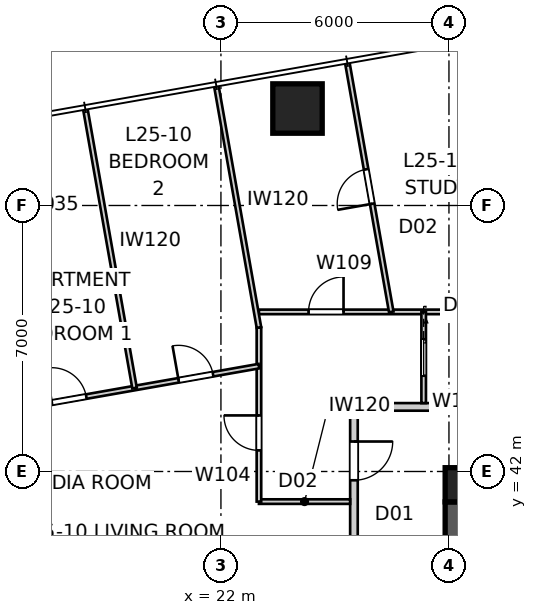
"""IFC4 building model, lengths in metres.
Left out: names, types, materials, properties, quantities, classifications, styles, units other than length and angle.
Written with IfcOpenShell. Run it as: python <this file> out.ifc"""

import sys

from ifc_helpers import new_model, si_unit, direction, frame, frame_2d, origin, origin_2d, place, context, subcontext, project, spatial, polyline, rectangle, outline, extrude, element, fill, save


model = new_model("IFC4")
c1 = context("Model", 3, precision=1e-05, world=origin(), true_north=direction((0.0, 1.0)))
c2 = subcontext(c1, "Body", "Model", "MODEL_VIEW")
j1 = project(units=[si_unit("LENGTHUNIT", "METRE"), si_unit("PLANEANGLEUNIT", "RADIAN")], contexts=[c1])
p1 = place(None, origin())
s1 = spatial("IfcSite", under=j1, at=p1, CompositionType="ELEMENT")
p2 = place(p1, origin())
s2 = spatial("IfcBuilding", under=s1, at=p2, CompositionType="ELEMENT")
p3 = place(p2, frame((0.0, 0.0, 93.0)))
s3 = spatial("IfcBuildingStorey", under=s2, at=p3, CompositionType="ELEMENT", Elevation=93.0)
p4 = place(p3, frame((28.35, 41.2, 0.0), z_axis=(0.0, 0.0, 1.0), x_axis=(0.0, -1.0, 0.0)))
e1 = element("IfcWall", 1, at=p4, inside=s3, PredefinedType="SHEAR", context=c2, shape_type="SweptSolid", body=[
    extrude(outline(polyline([(0.0, -0.45), (22.4, -0.45), (22.4, -0.025), (22.85, -0.025), (22.85, 0.025), (22.4, 0.025), (22.4, 0.45), (0.0, 0.45), (0.0, 0.025), (-0.45, 0.025), (-0.45, -0.025), (0.0, -0.025), (0.0, -0.45)])), origin(), (0.0, 0.0, 1.0), 3.4),
])
p5 = place(p4, frame((11.14, 0.0, 0.0)))
e2 = element("IfcOpeningElement", 2, at=p5, cuts=e1, PredefinedType="OPENING", context=c2, shape_type="SweptSolid", body=[
    extrude(rectangle(XDim=1.02, YDim=2.4, at=frame_2d((0.51, 1.2))), frame((0.0, 0.46, 0.0), z_axis=(0.0, -1.0, 0.0), x_axis=(1.0, 0.0, 0.0)), (0.0, 0.0, 1.0), 0.92),
])
p6 = place(p3, frame((28.35, 41.65, 0.0), z_axis=(0.0, 0.0, 1.0), x_axis=(1.0, 0.0, 0.0)))
e3 = element("IfcColumn", 3, at=p6, inside=s3, PredefinedType="COLUMN", context=c2, shape_type="SweptSolid", body=[
    extrude(rectangle(XDim=0.9, YDim=0.9, at=origin_2d()), origin(), (0.0, 0.0, 1.0), 3.4),
])
p7 = place(p3, frame((24.015, 51.552, 0.0), z_axis=(0.0, 0.0, 1.0), x_axis=(1.0, 0.0, 0.0)))
e4 = element("IfcColumn", 4, at=p7, inside=s3, PredefinedType="COLUMN", context=c2, shape_type="SweptSolid", body=[
    extrude(rectangle(XDim=1.3, YDim=1.3, at=origin_2d()), origin(), (0.0, 0.0, 1.0), 3.4),
])
p8 = place(p3, frame((54.5, 43.7, 0.0), z_axis=(0.0, 0.0, 1.0), x_axis=(-1.0, 0.0, 0.0)))
e5 = element("IfcWall", 5, at=p8, inside=s3, PredefinedType="PARTITIONING", context=c2, shape_type="SweptSolid", body=[
    extrude(rectangle(XDim=29.0, YDim=0.2, at=frame_2d((14.5, 0.0))), origin(), (0.0, 0.0, 1.0), 3.25),
])
p9 = place(p8, frame((11.951, 0.0, 0.0)))
e6 = element("IfcOpeningElement", 6, at=p9, cuts=e5, PredefinedType="OPENING", context=c2, shape_type="SweptSolid", body=[
    extrude(rectangle(XDim=1.02, YDim=2.34, at=frame_2d((0.51, 1.17))), frame((0.0, 0.11, 0.0), z_axis=(0.0, -1.0, 0.0), x_axis=(1.0, 0.0, 0.0)), (0.0, 0.0, 1.0), 0.22),
])
p10 = place(p8, frame((4.795, 0.0, 0.0)))
e7 = element("IfcOpeningElement", 7, at=p10, cuts=e5, PredefinedType="OPENING", context=c2, shape_type="SweptSolid", body=[
    extrude(rectangle(XDim=1.02, YDim=2.34, at=frame_2d((0.51, 1.17))), frame((0.0, 0.11, 0.0), z_axis=(0.0, -1.0, 0.0), x_axis=(1.0, 0.0, 0.0)), (0.0, 0.0, 1.0), 0.22),
])
p11 = place(p3, frame((25.5, 43.7, 0.0), z_axis=(0.0, 0.0, 1.0), x_axis=(0.0, -1.0, 0.0)))
e8 = element("IfcWall", 8, at=p11, inside=s3, PredefinedType="PARTITIONING", context=c2, shape_type="SweptSolid", body=[
    extrude(rectangle(XDim=27.4, YDim=0.2, at=frame_2d((13.7, 0.0))), origin(), (0.0, 0.0, 1.0), 3.25),
])
p12 = place(p11, frame((24.333, 0.0, 0.0)))
e9 = element("IfcOpeningElement", 9, at=p12, cuts=e8, PredefinedType="OPENING", context=c2, shape_type="SweptSolid", body=[
    extrude(rectangle(XDim=1.02, YDim=2.1, at=frame_2d((0.51, 1.05))), frame((0.0, 0.11, 0.0), z_axis=(0.0, -1.0, 0.0), x_axis=(1.0, 0.0, 0.0)), (0.0, 0.0, 1.0), 0.22),
])
p13 = place(p11, frame((10.631, 0.0, 0.0)))
e10 = element("IfcOpeningElement", 10, at=p13, cuts=e8, PredefinedType="OPENING", context=c2, shape_type="SweptSolid", body=[
    extrude(rectangle(XDim=1.02, YDim=2.34, at=frame_2d((0.51, 1.17))), frame((0.0, 0.11, 0.0), z_axis=(0.0, -1.0, 0.0), x_axis=(1.0, 0.0, 0.0)), (0.0, 0.0, 1.0), 0.22),
])
p14 = place(p11, frame((0.911, 0.0, 0.0)))
e11 = element("IfcOpeningElement", 11, at=p14, cuts=e8, PredefinedType="OPENING", context=c2, shape_type="SweptSolid", body=[
    extrude(rectangle(XDim=1.02, YDim=2.34, at=frame_2d((0.51, 1.17))), frame((0.0, 0.11, 0.0), z_axis=(0.0, -1.0, 0.0), x_axis=(1.0, 0.0, 0.0)), (0.0, 0.0, 1.0), 0.22),
])
p15 = place(p3, frame((23.0, 46.2, 0.0), z_axis=(0.0, 0.0, 1.0), x_axis=(1.0, 0.0, 0.0)))
e12 = element("IfcWall", 12, at=p15, inside=s3, PredefinedType="PARTITIONING", context=c2, shape_type="SweptSolid", body=[
    extrude(rectangle(XDim=34.0, YDim=0.12, at=frame_2d((17.0, 0.0))), origin(), (0.0, 0.0, 1.0), 2.55),
])
p16 = place(p15, frame((18.989, 0.0, 0.0)))
e13 = element("IfcOpeningElement", 13, at=p16, cuts=e12, PredefinedType="OPENING", context=c2, shape_type="SweptSolid", body=[
    extrude(rectangle(XDim=0.92, YDim=2.34, at=frame_2d((0.46, 1.17))), frame((0.0, 0.07, 0.0), z_axis=(0.0, -1.0, 0.0), x_axis=(1.0, 0.0, 0.0)), (0.0, 0.0, 1.0), 0.14),
])
p17 = place(p15, frame((1.306, 0.0, 0.0)))
e14 = element("IfcOpeningElement", 14, at=p17, cuts=e12, PredefinedType="OPENING", context=c2, shape_type="SweptSolid", body=[
    extrude(rectangle(XDim=0.92, YDim=2.34, at=frame_2d((0.46, 1.17))), frame((0.0, 0.07, 0.0), z_axis=(0.0, -1.0, 0.0), x_axis=(1.0, 0.0, 0.0)), (0.0, 0.0, 1.0), 0.14),
])
p18 = place(p15, frame((13.884, 0.0, 0.0)))
e15 = element("IfcOpeningElement", 15, at=p18, cuts=e12, PredefinedType="OPENING", context=c2, shape_type="SweptSolid", body=[
    extrude(rectangle(XDim=0.96, YDim=2.1, at=frame_2d((0.48, 1.05))), frame((0.0, 0.07, 0.0), z_axis=(0.0, -1.0, 0.0), x_axis=(1.0, 0.0, 0.0)), (0.0, 0.0, 1.0), 0.14),
])
p19 = place(p15, frame((21.929, 0.0, 0.0)))
e16 = element("IfcOpeningElement", 16, at=p19, cuts=e12, PredefinedType="OPENING", context=c2, shape_type="SweptSolid", body=[
    extrude(rectangle(XDim=0.96, YDim=2.1, at=frame_2d((0.48, 1.05))), frame((0.0, 0.07, 0.0), z_axis=(0.0, -1.0, 0.0), x_axis=(1.0, 0.0, 0.0)), (0.0, 0.0, 1.0), 0.14),
])
p20 = place(p3, frame((27.335, 46.2, 0.0), z_axis=(0.0, 0.0, 1.0), x_axis=(0.0, -1.0, 0.0)))
e17 = element("IfcWall", 17, at=p20, inside=s3, PredefinedType="PARTITIONING", context=c2, shape_type="SweptSolid", body=[
    extrude(rectangle(XDim=2.4, YDim=0.12, at=frame_2d((1.2, 0.0))), origin(), (0.0, 0.0, 1.0), 2.722),
])
p21 = place(p20, frame((0.72, 0.0, 0.0)))
e18 = element("IfcOpeningElement", 18, at=p21, cuts=e17, PredefinedType="OPENING", context=c2, shape_type="SweptSolid", body=[
    extrude(rectangle(XDim=0.96, YDim=2.1, at=frame_2d((0.48, 1.05))), frame((0.0, 0.07, 0.0), z_axis=(0.0, -1.0, 0.0), x_axis=(1.0, 0.0, 0.0)), (0.0, 0.0, 1.0), 0.14),
])
p22 = place(p3, frame((25.4, 41.208, 0.0), z_axis=(0.0, 0.0, 1.0), x_axis=(-1.0, 0.0, 0.0)))
e19 = element("IfcWall", 19, at=p22, inside=s3, PredefinedType="PARTITIONING", context=c2, shape_type="SweptSolid", body=[
    extrude(rectangle(XDim=2.4, YDim=0.12, at=frame_2d((1.2, 0.0))), origin(), (0.0, 0.0, 1.0), 2.638),
])
p23 = place(p3, frame((23.0, 41.208, 0.0), z_axis=(0.0, 0.0, 1.0), x_axis=(0.0, 1.0, 0.0)))
e20 = element("IfcWall", 20, at=p23, inside=s3, PredefinedType="PARTITIONING", context=c2, shape_type="SweptSolid", body=[
    extrude(rectangle(XDim=4.581, YDim=0.12, at=frame_2d((2.291, 0.0))), origin(), (0.0, 0.0, 1.0), 2.638),
])
p24 = place(p23, frame((1.348, 0.0, 0.0)))
e21 = element("IfcOpeningElement", 21, at=p24, cuts=e20, PredefinedType="OPENING", context=c2, shape_type="SweptSolid", body=[
    extrude(rectangle(XDim=0.92, YDim=2.34, at=frame_2d((0.46, 1.17))), frame((0.0, 0.07, 0.0), z_axis=(0.0, -1.0, 0.0), x_axis=(1.0, 0.0, 0.0)), (0.0, 0.0, 1.0), 0.14),
])
p25 = place(p3, frame((12.38, 42.9, 0.0), z_axis=(0.0, 0.0, 1.0), x_axis=(0.984807253583, 0.173651010046, 0.0)))
e22 = element("IfcWall", 22, at=p25, inside=s3, PredefinedType="PARTITIONING", context=c2, shape_type="SweptSolid", body=[
    extrude(rectangle(XDim=10.783, YDim=0.12, at=frame_2d((5.392, 0.0))), origin(), (0.0, 0.0, 1.0), 3.25),
])
p26 = place(p25, frame((1.525, 0.0, 0.0)))
e23 = element("IfcOpeningElement", 23, at=p26, cuts=e22, PredefinedType="OPENING", context=c2, shape_type="SweptSolid", body=[
    extrude(rectangle(XDim=0.92, YDim=2.34, at=frame_2d((0.46, 1.17))), frame((0.0, 0.07, 0.0), z_axis=(0.0, -1.0, 0.0), x_axis=(1.0, 0.0, 0.0)), (0.0, 0.0, 1.0), 0.14),
])
p27 = place(p25, frame((5.25, 0.0, 0.0)))
e24 = element("IfcOpeningElement", 24, at=p27, cuts=e22, PredefinedType="OPENING", context=c2, shape_type="SweptSolid", body=[
    extrude(rectangle(XDim=0.92, YDim=2.34, at=frame_2d((0.46, 1.17))), frame((0.0, 0.07, 0.0), z_axis=(0.0, -1.0, 0.0), x_axis=(1.0, 0.0, 0.0)), (0.0, 0.0, 1.0), 0.14),
])
p28 = place(p25, frame((8.637, 0.0, 0.0)))
e25 = element("IfcOpeningElement", 25, at=p28, cuts=e22, PredefinedType="OPENING", context=c2, shape_type="SweptSolid", body=[
    extrude(rectangle(XDim=0.92, YDim=2.34, at=frame_2d((0.46, 1.17))), frame((0.0, 0.07, 0.0), z_axis=(0.0, -1.0, 0.0), x_axis=(1.0, 0.0, 0.0)), (0.0, 0.0, 1.0), 0.14),
])
p29 = place(p3, frame((18.432, 51.542, 0.0), z_axis=(0.0, 0.0, 1.0), x_axis=(0.173647177755, -0.984807929323, 0.0)))
e26 = element("IfcWall", 26, at=p29, inside=s3, PredefinedType="PARTITIONING", context=c2, shape_type="SweptSolid", body=[
    extrude(rectangle(XDim=7.46, YDim=0.12, at=frame_2d((3.73, 0.0))), origin(), (0.0, 0.0, 1.0), 3.25),
])
p30 = place(p3, frame((21.878, 52.15, 0.0), z_axis=(0.0, 0.0, 1.0), x_axis=(0.173653792983, -0.984806762864, 0.0)))
e27 = element("IfcWall", 27, at=p30, inside=s3, PredefinedType="PARTITIONING", context=c2, shape_type="SweptSolid", body=[
    extrude(rectangle(XDim=6.459, YDim=0.12, at=frame_2d((3.229, 0.0))), origin(), (0.0, 0.0, 1.0), 2.638),
])
p31 = place(p3, frame((26.481, 46.2, 0.0), z_axis=(0.0, 0.0, 1.0), x_axis=(-0.173643103339, 0.98480864774, 0.0)))
e28 = element("IfcWall", 28, at=p31, inside=s3, PredefinedType="PARTITIONING", context=c2, shape_type="SweptSolid", body=[
    extrude(rectangle(XDim=6.659, YDim=0.12, at=frame_2d((3.329, 0.0))), origin(), (0.0, 0.0, 1.0), 3.25),
])
p32 = place(p31, frame((2.889, 0.0, 0.0)))
e29 = element("IfcOpeningElement", 29, at=p32, cuts=e28, PredefinedType="OPENING", context=c2, shape_type="SweptSolid", body=[
    extrude(rectangle(XDim=0.92, YDim=2.34, at=frame_2d((0.46, 1.17))), frame((0.0, 0.07, 0.0), z_axis=(0.0, -1.0, 0.0), x_axis=(1.0, 0.0, 0.0)), (0.0, 0.0, 1.0), 0.14),
])
p33 = place(p14, origin())
e30 = element("IfcDoor", 30, at=p33, inside=s3, OperationType="SINGLE_SWING_LEFT", PredefinedType="DOOR", context=c2, shape_type="SweptSolid", body=[
    extrude(rectangle(XDim=1.02, YDim=2.34, at=frame_2d((0.51, 1.17))), frame((0.0, 0.025, 0.0), z_axis=(0.0, -1.0, 0.0), x_axis=(1.0, 0.0, 0.0)), (0.0, 0.0, 1.0), 0.05),
])
fill(e11, e30)
p34 = place(p24, origin())
e31 = element("IfcDoor", 31, at=p34, inside=s3, OperationType="SINGLE_SWING_RIGHT", PredefinedType="DOOR", context=c2, shape_type="SweptSolid", body=[
    extrude(rectangle(XDim=0.92, YDim=2.34, at=frame_2d((0.46, 1.17))), frame((0.0, 0.025, 0.0), z_axis=(0.0, -1.0, 0.0), x_axis=(1.0, 0.0, 0.0)), (0.0, 0.0, 1.0), 0.05),
])
fill(e21, e31)
p35 = place(p17, origin())
e32 = element("IfcDoor", 32, at=p35, inside=s3, OperationType="SINGLE_SWING_RIGHT", PredefinedType="DOOR", context=c2, shape_type="SweptSolid", body=[
    extrude(rectangle(XDim=0.92, YDim=2.34, at=frame_2d((0.46, 1.17))), frame((0.0, 0.025, 0.0), z_axis=(0.0, -1.0, 0.0), x_axis=(1.0, 0.0, 0.0)), (0.0, 0.0, 1.0), 0.05),
])
fill(e14, e32)
p36 = place(p21, origin())
e33 = element("IfcDoor", 33, at=p36, inside=s3, OperationType="SLIDING_TO_LEFT", PredefinedType="DOOR", context=c2, shape_type="SweptSolid", body=[
    extrude(rectangle(XDim=0.96, YDim=2.1, at=frame_2d((0.48, 1.05))), frame((0.0, 0.025, 0.0), z_axis=(0.0, -1.0, 0.0), x_axis=(1.0, 0.0, 0.0)), (0.0, 0.0, 1.0), 0.05),
])
fill(e18, e33)
p37 = place(p27, origin())
e34 = element("IfcDoor", 34, at=p37, inside=s3, OperationType="SINGLE_SWING_LEFT", PredefinedType="DOOR", context=c2, shape_type="SweptSolid", body=[
    extrude(rectangle(XDim=0.92, YDim=2.34, at=frame_2d((0.46, 1.17))), frame((0.0, 0.025, 0.0), z_axis=(0.0, -1.0, 0.0), x_axis=(1.0, 0.0, 0.0)), (0.0, 0.0, 1.0), 0.05),
])
fill(e24, e34)
p38 = place(p28, origin())
e35 = element("IfcDoor", 35, at=p38, inside=s3, OperationType="SINGLE_SWING_LEFT", PredefinedType="DOOR", context=c2, shape_type="SweptSolid", body=[
    extrude(rectangle(XDim=0.92, YDim=2.34, at=frame_2d((0.46, 1.17))), frame((0.0, 0.025, 0.0), z_axis=(0.0, -1.0, 0.0), x_axis=(1.0, 0.0, 0.0)), (0.0, 0.0, 1.0), 0.05),
])
fill(e25, e35)
p39 = place(p32, origin())
e36 = element("IfcDoor", 36, at=p39, inside=s3, OperationType="SINGLE_SWING_LEFT", PredefinedType="DOOR", context=c2, shape_type="SweptSolid", body=[
    extrude(rectangle(XDim=0.92, YDim=2.34, at=frame_2d((0.46, 1.17))), frame((0.0, 0.025, 0.0), z_axis=(0.0, -1.0, 0.0), x_axis=(1.0, 0.0, 0.0)), (0.0, 0.0, 1.0), 0.05),
])
fill(e29, e36)
save(model, sys.argv[1])
